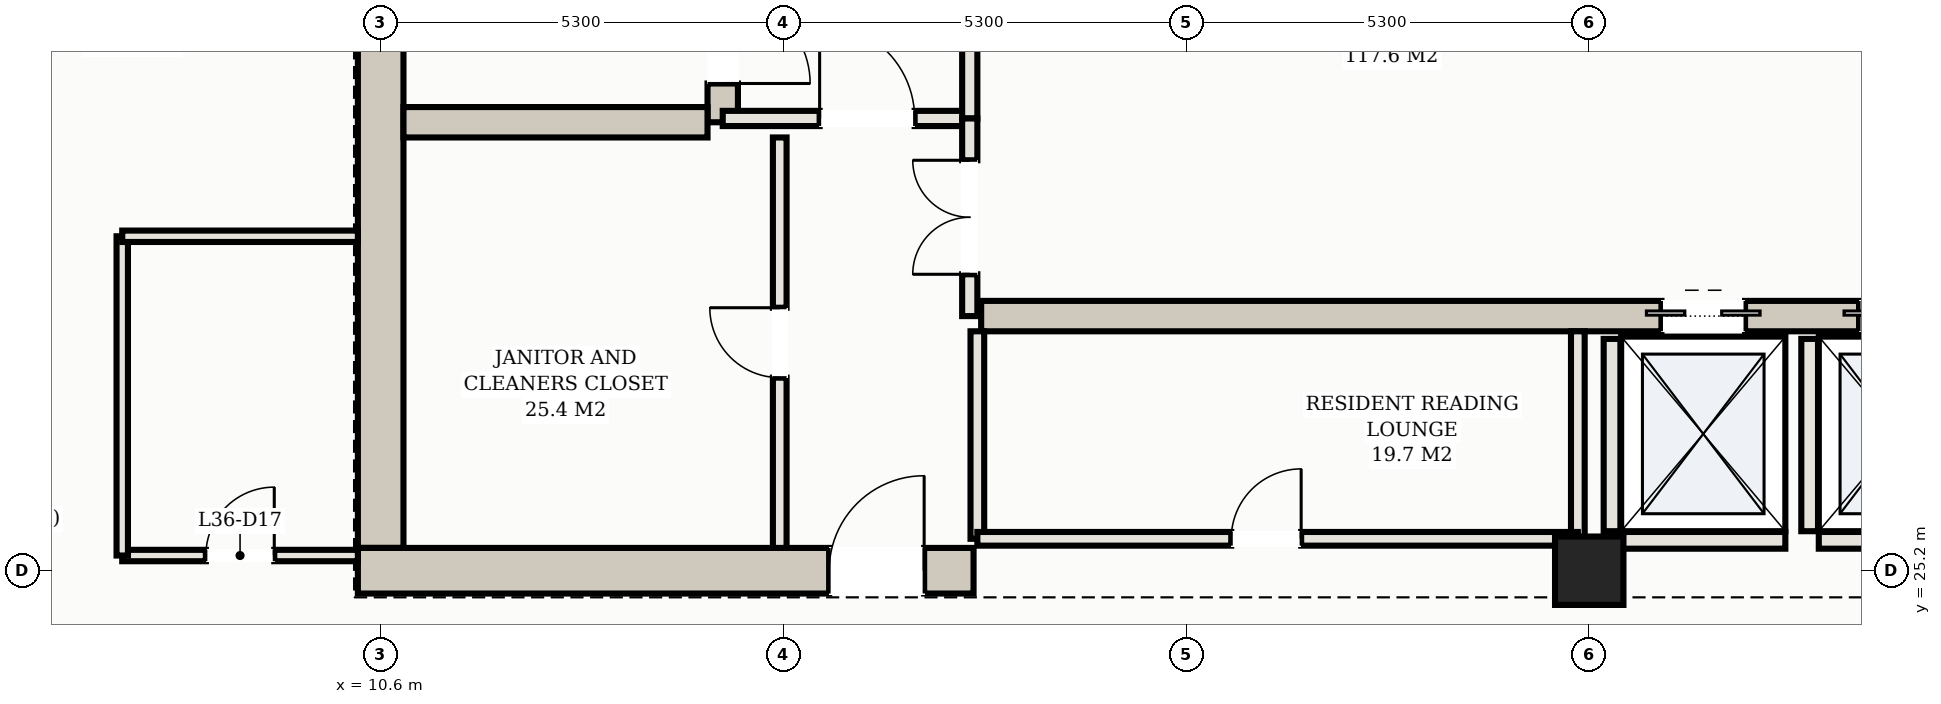
"""IFC4 building model, lengths in metres.
Left out: names, types, materials, properties, quantities, classifications, styles, units other than length and angle.
Written with IfcOpenShell. Run it as: python <this file> out.ifc"""

import sys

from ifc_helpers import new_model, si_unit, direction, frame, frame_2d, origin, origin_2d, place, context, subcontext, project, spatial, rectangle, hollow_rectangle, extrude, element, fill, save


model = new_model("IFC4")
c1 = context("Model", 3, precision=1e-05, world=origin(), true_north=direction((0.0, 1.0)))
c2 = subcontext(c1, "Body", "Model", "MODEL_VIEW")
j1 = project(units=[si_unit("LENGTHUNIT", "METRE"), si_unit("PLANEANGLEUNIT", "RADIAN")], contexts=[c1])
p1 = place(None, origin())
s1 = spatial("IfcSite", under=j1, at=p1, CompositionType="ELEMENT")
p2 = place(p1, origin())
s2 = spatial("IfcBuilding", under=s1, at=p2, CompositionType="ELEMENT")
p3 = place(p2, frame((0.0, 0.0, 134.7)))
s3 = spatial("IfcBuildingStorey", under=s2, at=p3, CompositionType="ELEMENT", Elevation=134.7)
p4 = place(p3, frame((10.6, 25.5, 0.0), z_axis=(0.0, 0.0, 1.0), x_axis=(0.0, 1.0, 0.0)))
e1 = element("IfcWall", 1, at=p4, inside=s3, PredefinedType="SHEAR", context=c2, shape_type="SweptSolid", body=[
    extrude(rectangle(XDim=14.2, YDim=0.6, at=frame_2d((7.1, 0.0))), origin(), (0.0, 0.0, 1.0), 4.3),
])
p5 = place(p3, frame((10.3, 25.2, 0.0), z_axis=(0.0, 0.0, 1.0), x_axis=(1.0, 0.0, 0.0)))
e2 = element("IfcWall", 2, at=p5, inside=s3, PredefinedType="SHEAR", context=c2, shape_type="SweptSolid", body=[
    extrude(rectangle(XDim=8.1, YDim=0.6, at=frame_2d((4.05, 0.0))), origin(), (0.0, 0.0, 1.0), 4.3),
])
p6 = place(p5, frame((6.2, 0.0, 0.0)))
e3 = element("IfcOpeningElement", 3, at=p6, cuts=e2, PredefinedType="OPENING", context=c2, shape_type="SweptSolid", body=[
    extrude(rectangle(XDim=1.25, YDim=2.2, at=frame_2d((0.625, 1.1))), frame((0.0, 0.31, 0.0), z_axis=(0.0, -1.0, 0.0), x_axis=(1.0, 0.0, 0.0)), (0.0, 0.0, 1.0), 0.62),
])
p7 = place(p3, frame((15.1, 31.1, 0.0), z_axis=(0.0, 0.0, 1.0), x_axis=(0.0, 1.0, 0.0)))
e4 = element("IfcWall", 4, at=p7, inside=s3, PredefinedType="SHEAR", context=c2, shape_type="SweptSolid", body=[
    extrude(rectangle(XDim=8.6, YDim=0.4, at=frame_2d((4.3, 0.0))), origin(), (0.0, 0.0, 1.0), 4.3),
])
p8 = place(p7, frame((0.51, 0.0, 0.0)))
e5 = element("IfcOpeningElement", 5, at=p8, cuts=e4, PredefinedType="OPENING", context=c2, shape_type="SweptSolid", body=[
    extrude(rectangle(XDim=1.15, YDim=2.2, at=frame_2d((0.575, 1.1))), frame((0.0, 0.21, 0.0), z_axis=(0.0, -1.0, 0.0), x_axis=(1.0, 0.0, 0.0)), (0.0, 0.0, 1.0), 0.42),
])
p9 = place(p3, frame((10.9, 31.1, 0.0), z_axis=(0.0, 0.0, 1.0), x_axis=(1.0, 0.0, 0.0)))
e6 = element("IfcWall", 6, at=p9, inside=s3, PredefinedType="SHEAR", context=c2, shape_type="SweptSolid", body=[
    extrude(rectangle(XDim=4.0, YDim=0.4, at=frame_2d((2.0, 0.0))), origin(), (0.0, 0.0, 1.0), 4.3),
])
p10 = place(p3, frame((18.5, 28.55, 0.0), z_axis=(0.0, 0.0, 1.0), x_axis=(1.0, 0.0, 0.0)))
e7 = element("IfcWall", 7, at=p10, inside=s3, PredefinedType="SHEAR", context=c2, shape_type="SweptSolid", body=[
    extrude(rectangle(XDim=16.0, YDim=0.4, at=frame_2d((8.0, 0.0))), origin(), (0.0, 0.0, 1.0), 4.3),
])
p11 = place(p10, frame((8.95, 0.0, 0.0)))
e8 = element("IfcOpeningElement", 8, at=p11, cuts=e7, PredefinedType="OPENING", context=c2, shape_type="SweptSolid", body=[
    extrude(rectangle(XDim=1.1, YDim=2.15, at=frame_2d((0.55, 1.075))), frame((0.0, 0.21, 0.0), z_axis=(0.0, -1.0, 0.0), x_axis=(1.0, 0.0, 0.0)), (0.0, 0.0, 1.0), 0.42),
])
p12 = place(p10, frame((11.55, 0.0, 0.0)))
e9 = element("IfcOpeningElement", 9, at=p12, cuts=e7, PredefinedType="OPENING", context=c2, shape_type="SweptSolid", body=[
    extrude(rectangle(XDim=1.1, YDim=2.15, at=frame_2d((0.55, 1.075))), frame((0.0, 0.21, 0.0), z_axis=(0.0, -1.0, 0.0), x_axis=(1.0, 0.0, 0.0)), (0.0, 0.0, 1.0), 0.42),
])
p13 = place(p10, frame((14.15, 0.0, 0.0)))
e10 = element("IfcOpeningElement", 10, at=p13, cuts=e7, PredefinedType="OPENING", context=c2, shape_type="SweptSolid", body=[
    extrude(rectangle(XDim=1.1, YDim=2.15, at=frame_2d((0.55, 1.075))), frame((0.0, 0.21, 0.0), z_axis=(0.0, -1.0, 0.0), x_axis=(1.0, 0.0, 0.0)), (0.0, 0.0, 1.0), 0.42),
])
p14 = place(p3, frame((26.5, 25.2, 0.0), z_axis=(0.0, 0.0, 1.0), x_axis=(1.0, 0.0, 0.0)))
e11 = element("IfcColumn", 11, at=p14, inside=s3, PredefinedType="COLUMN", context=c2, shape_type="SweptSolid", body=[
    extrude(hollow_rectangle(XDim=0.9, YDim=0.9, WallThickness=0.032, at=origin_2d()), origin(), (0.0, 0.0, 1.0), 4.5),
])
p15 = place(p3, frame((26.8, 25.72, 0.0), z_axis=(0.0, 0.0, 1.0), x_axis=(0.0, 1.0, 0.0)))
e12 = element("IfcWall", 12, at=p15, inside=s3, PredefinedType="SOLIDWALL", context=c2, shape_type="SweptSolid", body=[
    extrude(rectangle(XDim=2.53, YDim=0.22, at=frame_2d((1.265, 0.0))), origin(), (0.0, 0.0, 1.0), 4.3),
])
p16 = place(p3, frame((26.92, 25.6, 0.0), z_axis=(0.0, 0.0, 1.0), x_axis=(1.0, 0.0, 0.0)))
e13 = element("IfcWall", 13, at=p16, inside=s3, PredefinedType="SOLIDWALL", context=c2, shape_type="SweptSolid", body=[
    extrude(rectangle(XDim=2.16, YDim=0.22, at=frame_2d((1.08, 0.0))), origin(), (0.0, 0.0, 1.0), 3.495),
])
p17 = place(p3, frame((29.4, 25.72, 0.0), z_axis=(0.0, 0.0, 1.0), x_axis=(0.0, 1.0, 0.0)))
e14 = element("IfcWall", 14, at=p17, inside=s3, PredefinedType="SOLIDWALL", context=c2, shape_type="SweptSolid", body=[
    extrude(rectangle(XDim=2.53, YDim=0.22, at=frame_2d((1.265, 0.0))), origin(), (0.0, 0.0, 1.0), 4.3),
])
p18 = place(p3, frame((29.52, 25.6, 0.0), z_axis=(0.0, 0.0, 1.0), x_axis=(1.0, 0.0, 0.0)))
e15 = element("IfcWall", 15, at=p18, inside=s3, PredefinedType="SOLIDWALL", context=c2, shape_type="SweptSolid", body=[
    extrude(rectangle(XDim=2.16, YDim=0.22, at=frame_2d((1.08, 0.0))), origin(), (0.0, 0.0, 1.0), 3.495),
])
p19 = place(p3, frame((15.1, 31.15, 0.0), z_axis=(0.0, 0.0, 1.0), x_axis=(1.0, 0.0, 0.0)))
e16 = element("IfcWall", 16, at=p19, inside=s3, PredefinedType="PARTITIONING", context=c2, shape_type="SweptSolid", body=[
    extrude(rectangle(XDim=3.25, YDim=0.2, at=frame_2d((1.625, 0.0))), origin(), (0.0, 0.0, 1.0), 4.3),
])
p20 = place(p19, frame((1.275, 0.0, 0.0)))
e17 = element("IfcOpeningElement", 17, at=p20, cuts=e16, PredefinedType="OPENING", context=c2, shape_type="SweptSolid", body=[
    extrude(rectangle(XDim=1.25, YDim=2.2, at=frame_2d((0.625, 1.1))), frame((0.0, 0.11, 0.0), z_axis=(0.0, -1.0, 0.0), x_axis=(1.0, 0.0, 0.0)), (0.0, 0.0, 1.0), 0.22),
])
p21 = place(p3, frame((18.35, 31.15, 0.0), z_axis=(0.0, 0.0, 1.0), x_axis=(0.0, 1.0, 0.0)))
e18 = element("IfcWall", 18, at=p21, inside=s3, PredefinedType="PARTITIONING", context=c2, shape_type="SweptSolid", body=[
    extrude(rectangle(XDim=5.15, YDim=0.2, at=frame_2d((2.575, 0.0))), origin(), (0.0, 0.0, 1.0), 4.3),
])
p22 = place(p21, frame((1.875, 0.0, 0.0)))
e19 = element("IfcOpeningElement", 19, at=p22, cuts=e18, PredefinedType="OPENING", context=c2, shape_type="SweptSolid", body=[
    extrude(rectangle(XDim=1.25, YDim=2.2, at=frame_2d((0.625, 1.1))), frame((0.0, 0.11, 0.0), z_axis=(0.0, -1.0, 0.0), x_axis=(1.0, 0.0, 0.0)), (0.0, 0.0, 1.0), 0.22),
])
p23 = place(p3, frame((15.85, 25.5, 0.0), z_axis=(0.0, 0.0, 1.0), x_axis=(0.0, 1.0, 0.0)))
e20 = element("IfcWall", 20, at=p23, inside=s3, PredefinedType="PARTITIONING", context=c2, shape_type="SweptSolid", body=[
    extrude(rectangle(XDim=5.4, YDim=0.18, at=frame_2d((2.7, 0.0))), origin(), (0.0, 0.0, 1.0), 4.3),
])
p24 = place(p23, frame((2.24, 0.0, 0.0)))
e21 = element("IfcOpeningElement", 21, at=p24, cuts=e20, PredefinedType="OPENING", context=c2, shape_type="SweptSolid", body=[
    extrude(rectangle(XDim=0.92, YDim=2.15, at=frame_2d((0.46, 1.075))), frame((0.0, 0.1, 0.0), z_axis=(0.0, -1.0, 0.0), x_axis=(1.0, 0.0, 0.0)), (0.0, 0.0, 1.0), 0.2),
])
p25 = place(p3, frame((18.35, 28.55, 0.0), z_axis=(0.0, 0.0, 1.0), x_axis=(0.0, 1.0, 0.0)))
e22 = element("IfcWall", 22, at=p25, inside=s3, PredefinedType="PARTITIONING", context=c2, shape_type="SweptSolid", body=[
    extrude(rectangle(XDim=2.6, YDim=0.2, at=frame_2d((1.3, 0.0))), origin(), (0.0, 0.0, 1.0), 4.3),
])
p26 = place(p25, frame((0.55, 0.0, 0.0)))
e23 = element("IfcOpeningElement", 23, at=p26, cuts=e22, PredefinedType="OPENING", context=c2, shape_type="SweptSolid", body=[
    extrude(rectangle(XDim=1.5, YDim=2.25, at=frame_2d((0.75, 1.125))), frame((0.0, 0.11, 0.0), z_axis=(0.0, -1.0, 0.0), x_axis=(1.0, 0.0, 0.0)), (0.0, 0.0, 1.0), 0.22),
])
for number, where, z_axis, x_axis in (
    (24, (18.45, 25.62, 0.0), (0.0, 0.0, 1.0), (0.0, 1.0, 0.0)),
    (25, (26.35, 25.62, 0.0), (0.0, 0.0, 1.0), (0.0, 1.0, 0.0)),
):
    element("IfcWall", number, at=place(p3, frame(where, z_axis=z_axis, x_axis=x_axis)), inside=s3, PredefinedType="PARTITIONING", context=c2, shape_type="SweptSolid", body=[
        extrude(rectangle(XDim=2.73, YDim=0.18, at=frame_2d((1.365, 0.0))), origin(), (0.0, 0.0, 1.0), 4.3),
    ])
p27 = place(p3, frame((18.45, 25.62, 0.0), z_axis=(0.0, 0.0, 1.0), x_axis=(1.0, 0.0, 0.0)))
e26 = element("IfcWall", 26, at=p27, inside=s3, PredefinedType="PARTITIONING", context=c2, shape_type="SweptSolid", body=[
    extrude(rectangle(XDim=7.9, YDim=0.18, at=frame_2d((3.95, 0.0))), origin(), (0.0, 0.0, 1.0), 4.3),
])
p28 = place(p27, frame((3.34, 0.0, 0.0)))
e27 = element("IfcOpeningElement", 27, at=p28, cuts=e26, PredefinedType="OPENING", context=c2, shape_type="SweptSolid", body=[
    extrude(rectangle(XDim=0.92, YDim=2.15, at=frame_2d((0.46, 1.075))), frame((0.0, 0.1, 0.0), z_axis=(0.0, -1.0, 0.0), x_axis=(1.0, 0.0, 0.0)), (0.0, 0.0, 1.0), 0.2),
])
p29 = place(p3, frame((7.2, 25.4, 0.0), z_axis=(0.0, 0.0, 1.0), x_axis=(1.0, 0.0, 0.0)))
e28 = element("IfcWall", 28, at=p29, inside=s3, PredefinedType="PARTITIONING", context=c2, shape_type="SweptSolid", body=[
    extrude(rectangle(XDim=3.1, YDim=0.15, at=frame_2d((1.55, 0.0))), origin(), (0.0, 0.0, 1.0), 3.595),
])
p30 = place(p29, frame((1.1, 0.0, 0.0)))
e29 = element("IfcOpeningElement", 29, at=p30, cuts=e28, PredefinedType="OPENING", context=c2, shape_type="SweptSolid", body=[
    extrude(rectangle(XDim=0.9, YDim=2.15, at=frame_2d((0.45, 1.075))), frame((0.0, 0.085, 0.0), z_axis=(0.0, -1.0, 0.0), x_axis=(1.0, 0.0, 0.0)), (0.0, 0.0, 1.0), 0.17),
])
p31 = place(p3, frame((7.2, 25.4, 0.0), z_axis=(0.0, 0.0, 1.0), x_axis=(0.0, 1.0, 0.0)))
e30 = element("IfcWall", 30, at=p31, inside=s3, PredefinedType="PARTITIONING", context=c2, shape_type="SweptSolid", body=[
    extrude(rectangle(XDim=4.2, YDim=0.15, at=frame_2d((2.1, 0.0))), origin(), (0.0, 0.0, 1.0), 4.3),
])
p32 = place(p3, frame((7.2, 29.6, 0.0), z_axis=(0.0, 0.0, 1.0), x_axis=(1.0, 0.0, 0.0)))
e31 = element("IfcWall", 31, at=p32, inside=s3, PredefinedType="PARTITIONING", context=c2, shape_type="SweptSolid", body=[
    extrude(rectangle(XDim=3.1, YDim=0.15, at=frame_2d((1.55, 0.0))), origin(), (0.0, 0.0, 1.0), 4.3),
])
p33 = place(p11, origin())
e32 = element("IfcDoor", 32, at=p33, inside=s3, OperationType="DOUBLE_DOOR_SLIDING", PredefinedType="DOOR", context=c2, shape_type="SweptSolid", body=[
    extrude(rectangle(XDim=1.1, YDim=2.15, at=frame_2d((0.55, 1.075))), frame((0.0, 0.025, 0.0), z_axis=(0.0, -1.0, 0.0), x_axis=(1.0, 0.0, 0.0)), (0.0, 0.0, 1.0), 0.05),
])
fill(e8, e32)
p34 = place(p12, origin())
e33 = element("IfcDoor", 33, at=p34, inside=s3, OperationType="DOUBLE_DOOR_SLIDING", PredefinedType="DOOR", context=c2, shape_type="SweptSolid", body=[
    extrude(rectangle(XDim=1.1, YDim=2.15, at=frame_2d((0.55, 1.075))), frame((0.0, 0.025, 0.0), z_axis=(0.0, -1.0, 0.0), x_axis=(1.0, 0.0, 0.0)), (0.0, 0.0, 1.0), 0.05),
])
fill(e9, e33)
p35 = place(p6, origin())
e34 = element("IfcDoor", 34, at=p35, inside=s3, OperationType="SINGLE_SWING_RIGHT", PredefinedType="DOOR", context=c2, shape_type="SweptSolid", body=[
    extrude(rectangle(XDim=1.25, YDim=2.2, at=frame_2d((0.625, 1.1))), frame((0.0, 0.025, 0.0), z_axis=(0.0, -1.0, 0.0), x_axis=(1.0, 0.0, 0.0)), (0.0, 0.0, 1.0), 0.05),
])
fill(e3, e34)
p36 = place(p20, origin())
e35 = element("IfcDoor", 35, at=p36, inside=s3, OperationType="SINGLE_SWING_LEFT", PredefinedType="DOOR", context=c2, shape_type="SweptSolid", body=[
    extrude(rectangle(XDim=1.25, YDim=2.2, at=frame_2d((0.625, 1.1))), frame((0.0, 0.025, 0.0), z_axis=(0.0, -1.0, 0.0), x_axis=(1.0, 0.0, 0.0)), (0.0, 0.0, 1.0), 0.05),
])
fill(e17, e35)
p37 = place(p8, frame((1.15, 0.0, 0.0), z_axis=(0.0, 0.0, 1.0), x_axis=(-1.0, 0.0, 0.0)))
e36 = element("IfcDoor", 36, at=p37, inside=s3, OperationType="SINGLE_SWING_RIGHT", PredefinedType="DOOR", context=c2, shape_type="SweptSolid", body=[
    extrude(rectangle(XDim=1.15, YDim=2.2, at=frame_2d((0.575, 1.1))), frame((0.0, 0.025, 0.0), z_axis=(0.0, -1.0, 0.0), x_axis=(1.0, 0.0, 0.0)), (0.0, 0.0, 1.0), 0.05),
])
fill(e5, e36)
p38 = place(p24, origin())
e37 = element("IfcDoor", 37, at=p38, inside=s3, OperationType="SINGLE_SWING_RIGHT", PredefinedType="DOOR", context=c2, shape_type="SweptSolid", body=[
    extrude(rectangle(XDim=0.92, YDim=2.15, at=frame_2d((0.46, 1.075))), frame((0.0, 0.025, 0.0), z_axis=(0.0, -1.0, 0.0), x_axis=(1.0, 0.0, 0.0)), (0.0, 0.0, 1.0), 0.05),
])
fill(e21, e37)
p39 = place(p26, origin())
e38 = element("IfcDoor", 38, at=p39, inside=s3, OperationType="DOUBLE_DOOR_SINGLE_SWING", PredefinedType="DOOR", context=c2, shape_type="SweptSolid", body=[
    extrude(rectangle(XDim=1.5, YDim=2.25, at=frame_2d((0.75, 1.125))), frame((0.0, 0.025, 0.0), z_axis=(0.0, -1.0, 0.0), x_axis=(1.0, 0.0, 0.0)), (0.0, 0.0, 1.0), 0.05),
])
fill(e23, e38)
p40 = place(p28, origin())
e39 = element("IfcDoor", 39, at=p40, inside=s3, OperationType="SINGLE_SWING_RIGHT", PredefinedType="DOOR", context=c2, shape_type="SweptSolid", body=[
    extrude(rectangle(XDim=0.92, YDim=2.15, at=frame_2d((0.46, 1.075))), frame((0.0, 0.025, 0.0), z_axis=(0.0, -1.0, 0.0), x_axis=(1.0, 0.0, 0.0)), (0.0, 0.0, 1.0), 0.05),
])
fill(e27, e39)
p41 = place(p30, origin())
e40 = element("IfcDoor", 40, at=p41, inside=s3, OperationType="SINGLE_SWING_RIGHT", PredefinedType="DOOR", context=c2, shape_type="SweptSolid", body=[
    extrude(rectangle(XDim=0.9, YDim=2.15, at=frame_2d((0.45, 1.075))), frame((0.0, 0.025, 0.0), z_axis=(0.0, -1.0, 0.0), x_axis=(1.0, 0.0, 0.0)), (0.0, 0.0, 1.0), 0.05),
])
fill(e29, e40)
save(model, sys.argv[1])
